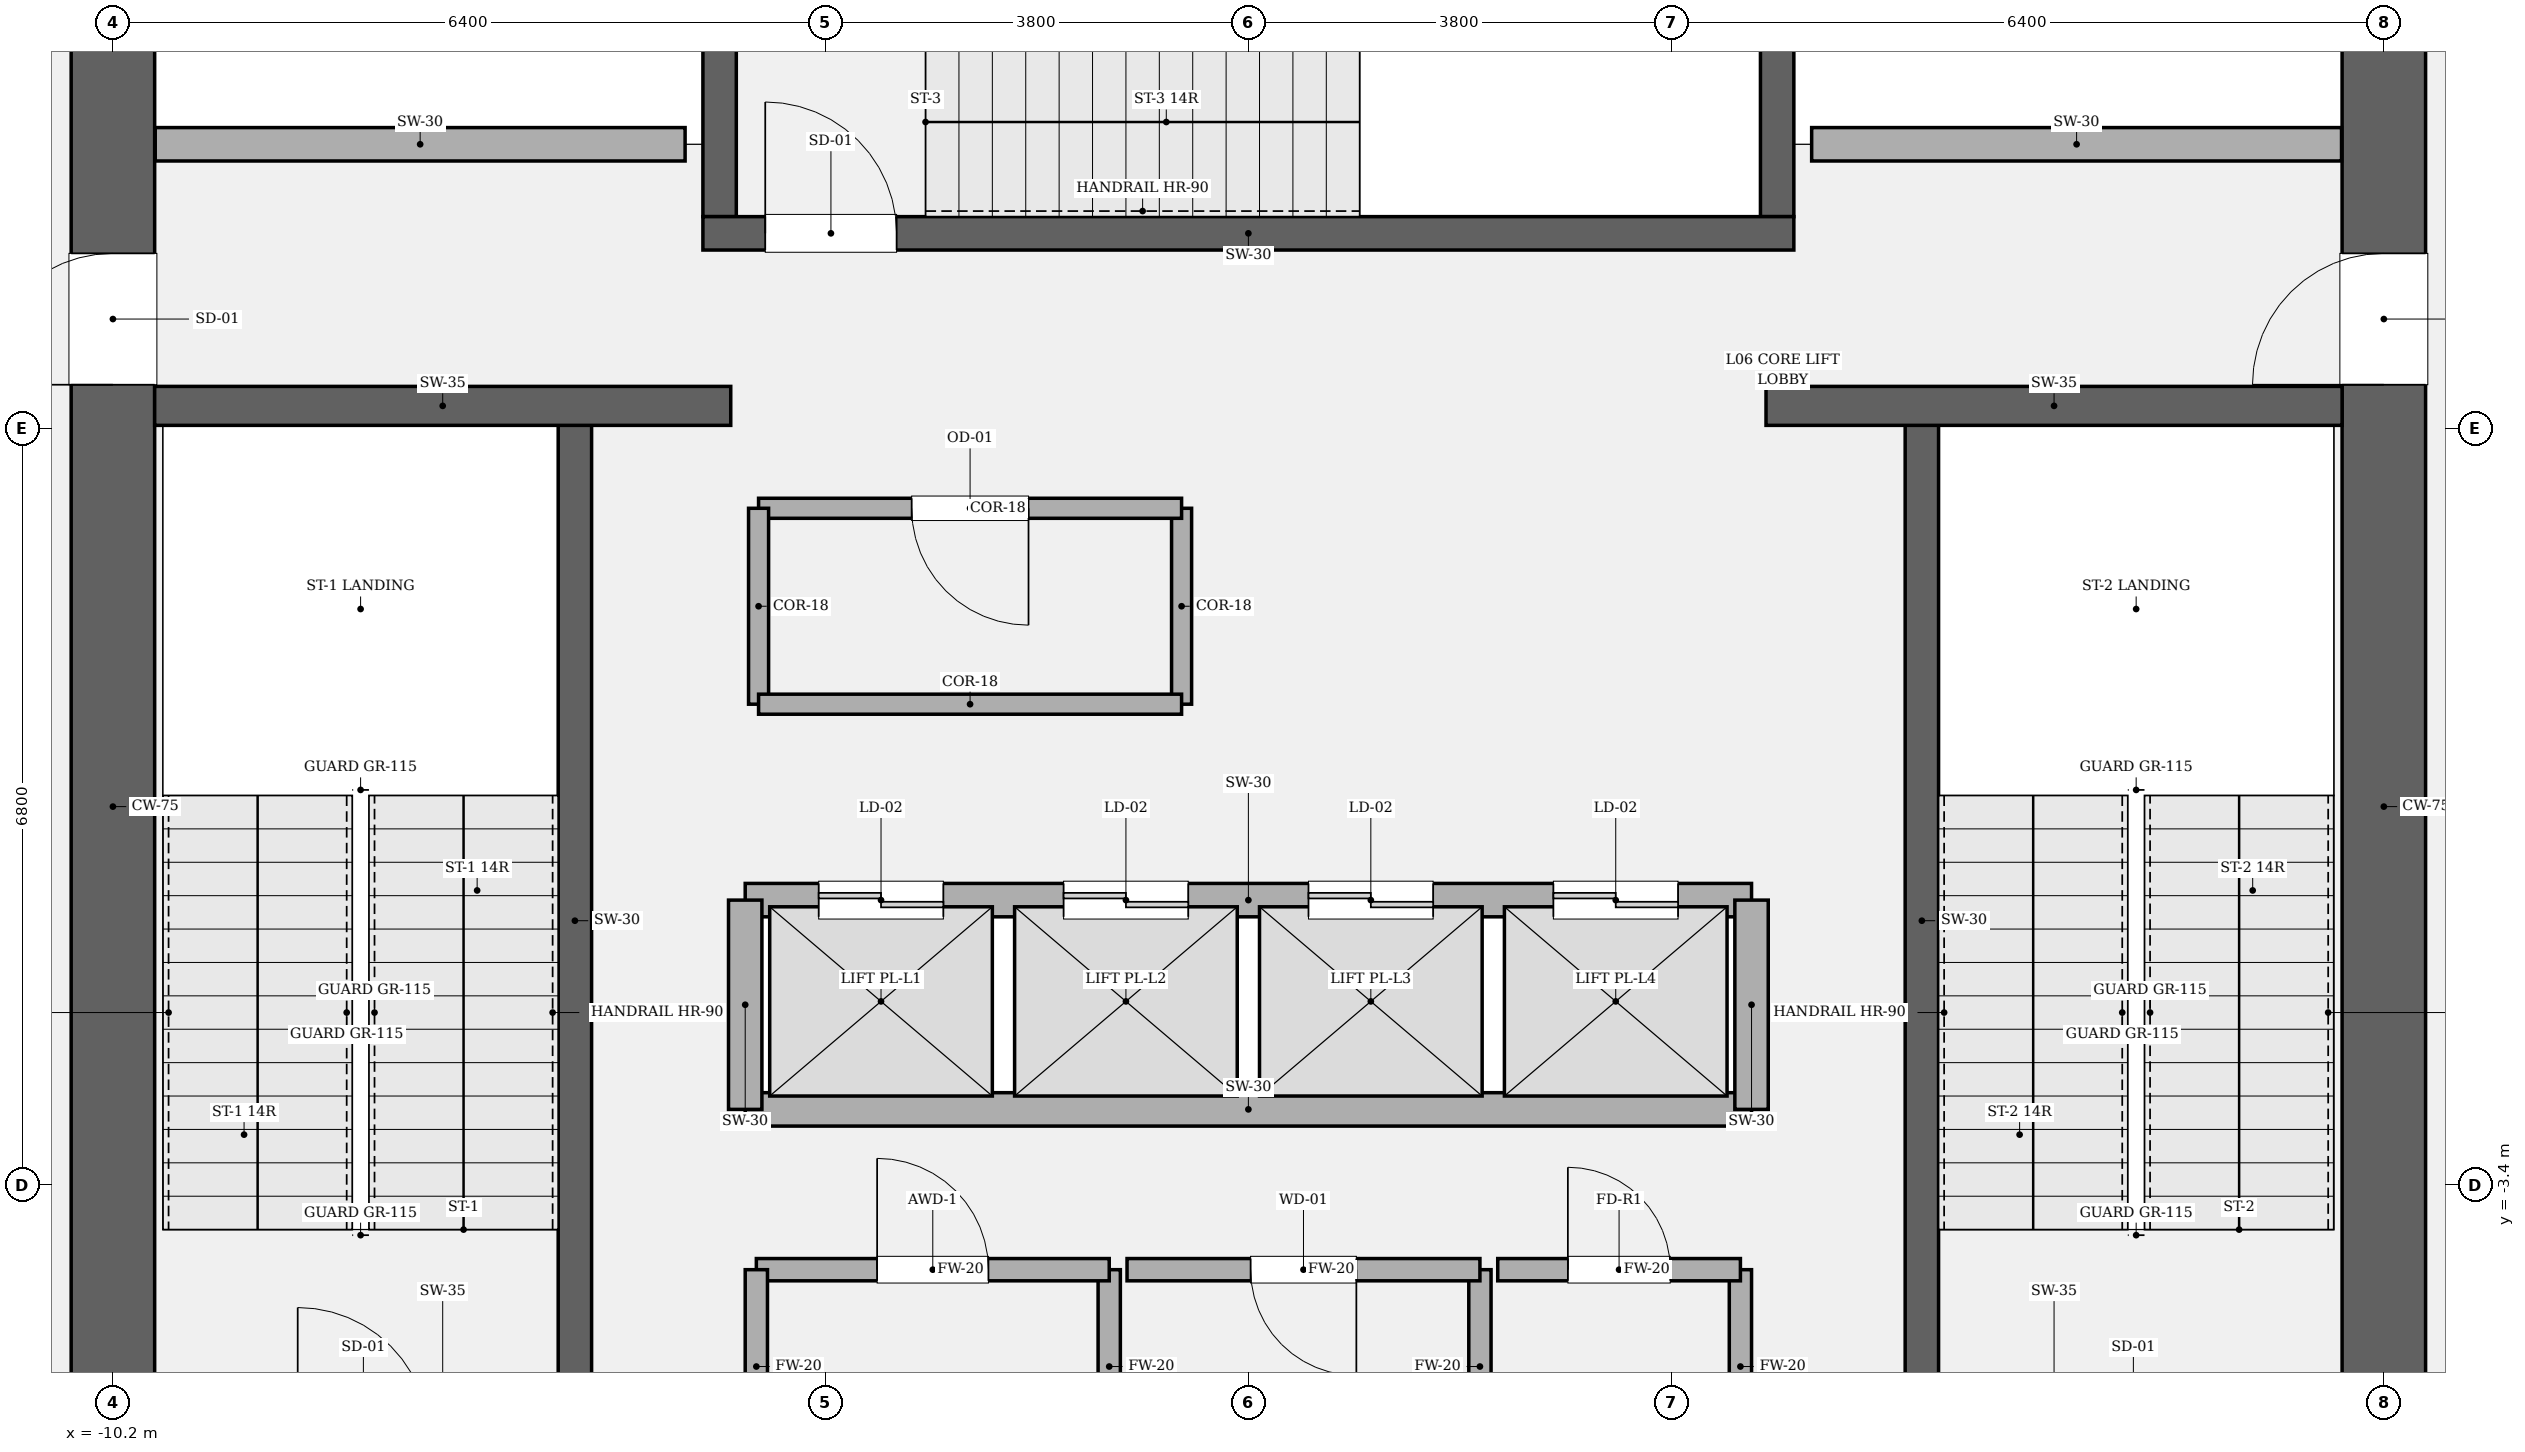
"""IFC4 building model, lengths in metres.
Left out: names, types, materials, properties, quantities, classifications, styles, units other than length and angle.
Written with IfcOpenShell. Run it as: python <this file> out.ifc"""

import sys

from ifc_helpers import new_model, si_unit, direction, frame, frame_2d, origin, place, context, subcontext, project, spatial, rectangle, extrude, element, fill, save


model = new_model("IFC4")
c1 = context("Model", 3, precision=1e-05, world=origin(), true_north=direction((0.0, 1.0)))
c2 = subcontext(c1, "Body", "Model", "MODEL_VIEW")
j1 = project(units=[si_unit("LENGTHUNIT", "METRE"), si_unit("PLANEANGLEUNIT", "RADIAN")], contexts=[c1])
p1 = place(None, origin())
s1 = spatial("IfcSite", under=j1, at=p1, CompositionType="ELEMENT")
p2 = place(p1, origin())
s2 = spatial("IfcBuilding", under=s1, at=p2, CompositionType="ELEMENT")
p3 = place(p2, frame((0.0, 0.0, 32.25)))
s3 = spatial("IfcBuildingStorey", under=s2, at=p3, CompositionType="ELEMENT", Elevation=32.25)
p4 = place(p3, frame((-10.2, -8.825, 0.0), z_axis=(0.0, 0.0, 1.0), x_axis=(0.0, 1.0, 0.0)))
e1 = element("IfcWall", 1, at=p4, inside=s3, PredefinedType="SHEAR", context=c2, shape_type="SweptSolid", body=[
    extrude(rectangle(XDim=17.65, YDim=0.75, at=frame_2d((8.825, 0.0))), origin(), (0.0, 0.0, 1.0), 4.05),
])
p5 = place(p4, frame((12.615, 0.0, 0.0)))
e2 = element("IfcOpeningElement", 2, at=p5, cuts=e1, PredefinedType="OPENING", context=c2, shape_type="SweptSolid", body=[
    extrude(rectangle(XDim=1.18, YDim=2.2, at=frame_2d((0.59, 1.1))), frame((0.0, 0.385, 0.0), z_axis=(0.0, -1.0, 0.0), x_axis=(1.0, 0.0, 0.0)), (0.0, 0.0, 1.0), 0.77),
])
p6 = place(p3, frame((10.2, 8.825, 0.0), z_axis=(0.0, 0.0, 1.0), x_axis=(0.0, -1.0, 0.0)))
e3 = element("IfcWall", 3, at=p6, inside=s3, PredefinedType="SHEAR", context=c2, shape_type="SweptSolid", body=[
    extrude(rectangle(XDim=17.65, YDim=0.75, at=frame_2d((8.825, 0.0))), origin(), (0.0, 0.0, 1.0), 4.05),
])
p7 = place(p6, frame((3.855, 0.0, 0.0)))
e4 = element("IfcOpeningElement", 4, at=p7, cuts=e3, PredefinedType="OPENING", context=c2, shape_type="SweptSolid", body=[
    extrude(rectangle(XDim=1.18, YDim=2.2, at=frame_2d((0.59, 1.1))), frame((0.0, 0.385, 0.0), z_axis=(0.0, -1.0, 0.0), x_axis=(1.0, 0.0, 0.0)), (0.0, 0.0, 1.0), 0.77),
])
for number, where, z_axis, x_axis in (
    (5, (-6.05, -5.5, 0.0), (0.0, 0.0, 1.0), (0.0, 1.0, 0.0)),
    (6, (6.05, 3.45, 0.0), (0.0, 0.0, 1.0), (0.0, -1.0, 0.0)),
):
    element("IfcWall", number, at=place(p3, frame(where, z_axis=z_axis, x_axis=x_axis)), inside=s3, PredefinedType="SOLIDWALL", context=c2, shape_type="SweptSolid", body=[
        extrude(rectangle(XDim=8.95, YDim=0.3, at=frame_2d((4.475, 0.0))), origin(), (0.0, 0.0, 1.0), 4.05),
    ])
for number, where, z_axis, x_axis in (
    (7, (-4.75, 5.3, 0.0), (0.0, 0.0, 1.0), (0.0, 1.0, 0.0)),
    (8, (4.75, 8.825, 0.0), (0.0, 0.0, 1.0), (0.0, -1.0, 0.0)),
):
    element("IfcWall", number, at=place(p3, frame(where, z_axis=z_axis, x_axis=x_axis)), inside=s3, PredefinedType="SOLIDWALL", context=c2, shape_type="SweptSolid", body=[
        extrude(rectangle(XDim=3.525, YDim=0.3, at=frame_2d((1.762, 0.0))), origin(), (0.0, 0.0, 1.0), 4.05),
    ])
p8 = place(p3, frame((-4.9, 5.15, 0.0), z_axis=(0.0, 0.0, 1.0), x_axis=(1.0, 0.0, 0.0)))
e9 = element("IfcWall", 9, at=p8, inside=s3, PredefinedType="SOLIDWALL", context=c2, shape_type="SweptSolid", body=[
    extrude(rectangle(XDim=9.8, YDim=0.3, at=frame_2d((4.9, 0.0))), origin(), (0.0, 0.0, 1.0), 4.05),
])
p9 = place(p8, frame((0.56, 0.0, 0.0)))
e10 = element("IfcOpeningElement", 10, at=p9, cuts=e9, PredefinedType="OPENING", context=c2, shape_type="SweptSolid", body=[
    extrude(rectangle(XDim=1.18, YDim=2.2, at=frame_2d((0.59, 1.1))), frame((0.0, 0.16, 0.0), z_axis=(0.0, -1.0, 0.0), x_axis=(1.0, 0.0, 0.0)), (0.0, 0.0, 1.0), 0.32),
])
for number, where, z_axis, x_axis in (
    (11, (-9.825, 3.6, 0.0), (0.0, 0.0, 1.0), (1.0, 0.0, 0.0)),
    (12, (4.65, 3.6, 0.0), (0.0, 0.0, 1.0), (1.0, 0.0, 0.0)),
):
    element("IfcWall", number, at=place(p3, frame(where, z_axis=z_axis, x_axis=x_axis)), inside=s3, PredefinedType="SOLIDWALL", context=c2, shape_type="SweptSolid", body=[
        extrude(rectangle(XDim=5.175, YDim=0.35, at=frame_2d((2.587, 0.0))), origin(), (0.0, 0.0, 1.0), 4.05),
    ])
p10 = place(p3, frame((-4.52, -0.84, 0.0), z_axis=(0.0, 0.0, 1.0), x_axis=(1.0, 0.0, 0.0)))
e13 = element("IfcWall", 13, at=p10, inside=s3, PredefinedType="SOLIDWALL", context=c2, shape_type="SweptSolid", body=[
    extrude(rectangle(XDim=9.04, YDim=0.3, at=frame_2d((4.52, 0.0))), origin(), (0.0, 0.0, 1.0), 3.81),
])
p11 = place(p10, frame((0.66, 0.0, 0.0)))
e14 = element("IfcOpeningElement", 14, at=p11, cuts=e13, PredefinedType="OPENING", context=c2, shape_type="SweptSolid", body=[
    extrude(rectangle(XDim=1.12, YDim=2.25, at=frame_2d((0.56, 1.125))), frame((0.0, 0.16, 0.0), z_axis=(0.0, -1.0, 0.0), x_axis=(1.0, 0.0, 0.0)), (0.0, 0.0, 1.0), 0.32),
])
p12 = place(p10, frame((2.86, 0.0, 0.0)))
e15 = element("IfcOpeningElement", 15, at=p12, cuts=e13, PredefinedType="OPENING", context=c2, shape_type="SweptSolid", body=[
    extrude(rectangle(XDim=1.12, YDim=2.25, at=frame_2d((0.56, 1.125))), frame((0.0, 0.16, 0.0), z_axis=(0.0, -1.0, 0.0), x_axis=(1.0, 0.0, 0.0)), (0.0, 0.0, 1.0), 0.32),
])
p13 = place(p10, frame((5.06, 0.0, 0.0)))
e16 = element("IfcOpeningElement", 16, at=p13, cuts=e13, PredefinedType="OPENING", context=c2, shape_type="SweptSolid", body=[
    extrude(rectangle(XDim=1.12, YDim=2.25, at=frame_2d((0.56, 1.125))), frame((0.0, 0.16, 0.0), z_axis=(0.0, -1.0, 0.0), x_axis=(1.0, 0.0, 0.0)), (0.0, 0.0, 1.0), 0.32),
])
p14 = place(p10, frame((7.26, 0.0, 0.0)))
e17 = element("IfcOpeningElement", 17, at=p14, cuts=e13, PredefinedType="OPENING", context=c2, shape_type="SweptSolid", body=[
    extrude(rectangle(XDim=1.12, YDim=2.25, at=frame_2d((0.56, 1.125))), frame((0.0, 0.16, 0.0), z_axis=(0.0, -1.0, 0.0), x_axis=(1.0, 0.0, 0.0)), (0.0, 0.0, 1.0), 0.32),
])
p15 = place(p3, frame((-4.52, -2.72, 0.0), z_axis=(0.0, 0.0, 1.0), x_axis=(1.0, 0.0, 0.0)))
e18 = element("IfcWall", 18, at=p15, inside=s3, PredefinedType="SOLIDWALL", context=c2, shape_type="SweptSolid", body=[
    extrude(rectangle(XDim=9.04, YDim=0.3, at=frame_2d((4.52, 0.0))), origin(), (0.0, 0.0, 1.0), 3.81),
])
for number, where, z_axis, x_axis in (
    (19, (-4.52, -2.72, 0.0), (0.0, 0.0, 1.0), (0.0, 1.0, 0.0)),
    (20, (4.52, -2.72, 0.0), (0.0, 0.0, 1.0), (0.0, 1.0, 0.0)),
):
    element("IfcWall", number, at=place(p3, frame(where, z_axis=z_axis, x_axis=x_axis)), inside=s3, PredefinedType="SOLIDWALL", context=c2, shape_type="SweptSolid", body=[
        extrude(rectangle(XDim=1.88, YDim=0.3, at=frame_2d((0.94, 0.0))), origin(), (0.0, 0.0, 1.0), 3.81),
    ])
for number, where, z_axis, x_axis in (
    (21, (-9.82, 5.95, 0.0), (0.0, 0.0, 1.0), (1.0, 0.0, 0.0)),
    (22, (5.06, 5.95, 0.0), (0.0, 0.0, 1.0), (1.0, 0.0, 0.0)),
):
    element("IfcWall", number, at=place(p3, frame(where, z_axis=z_axis, x_axis=x_axis)), inside=s3, PredefinedType="SOLIDWALL", context=c2, shape_type="SweptSolid", body=[
        extrude(rectangle(XDim=4.76, YDim=0.3, at=frame_2d((2.38, 0.0))), origin(), (0.0, 0.0, 1.0), 3.81),
    ])
p16 = place(p3, frame((-1.25, -5.9, 0.0), z_axis=(0.0, 0.0, 1.0), x_axis=(0.0, 1.0, 0.0)))
e23 = element("IfcWall", 23, at=p16, inside=s3, PredefinedType="SOLIDWALL", context=c2, shape_type="SweptSolid", body=[
    extrude(rectangle(XDim=1.74, YDim=0.2, at=frame_2d((0.87, 0.0))), origin(), (0.0, 0.0, 1.0), 3.81),
])
p17 = place(p3, frame((-1.25, -4.16, 0.0), z_axis=(0.0, 0.0, 1.0), x_axis=(-1.0, 0.0, 0.0)))
e24 = element("IfcWall", 24, at=p17, inside=s3, PredefinedType="SOLIDWALL", context=c2, shape_type="SweptSolid", body=[
    extrude(rectangle(XDim=3.17, YDim=0.2, at=frame_2d((1.585, 0.0))), origin(), (0.0, 0.0, 1.0), 3.81),
])
p18 = place(p17, frame((1.085, 0.0, 0.0)))
e25 = element("IfcOpeningElement", 25, at=p18, cuts=e24, PredefinedType="OPENING", context=c2, shape_type="SweptSolid", body=[
    extrude(rectangle(XDim=1.0, YDim=2.15, at=frame_2d((0.5, 1.075))), frame((0.0, 0.11, 0.0), z_axis=(0.0, -1.0, 0.0), x_axis=(1.0, 0.0, 0.0)), (0.0, 0.0, 1.0), 0.22),
])
for number, where, z_axis, x_axis in (
    (26, (-4.42, -4.16, 0.0), (0.0, 0.0, 1.0), (0.0, -1.0, 0.0)),
    (27, (2.08, -5.9, 0.0), (0.0, 0.0, 1.0), (0.0, 1.0, 0.0)),
):
    element("IfcWall", number, at=place(p3, frame(where, z_axis=z_axis, x_axis=x_axis)), inside=s3, PredefinedType="SOLIDWALL", context=c2, shape_type="SweptSolid", body=[
        extrude(rectangle(XDim=1.74, YDim=0.2, at=frame_2d((0.87, 0.0))), origin(), (0.0, 0.0, 1.0), 3.81),
    ])
p19 = place(p3, frame((2.08, -4.16, 0.0), z_axis=(0.0, 0.0, 1.0), x_axis=(-1.0, 0.0, 0.0)))
e28 = element("IfcWall", 28, at=p19, inside=s3, PredefinedType="SOLIDWALL", context=c2, shape_type="SweptSolid", body=[
    extrude(rectangle(XDim=3.17, YDim=0.2, at=frame_2d((1.585, 0.0))), origin(), (0.0, 0.0, 1.0), 3.81),
])
p20 = place(p19, frame((1.11, 0.0, 0.0)))
e29 = element("IfcOpeningElement", 29, at=p20, cuts=e28, PredefinedType="OPENING", context=c2, shape_type="SweptSolid", body=[
    extrude(rectangle(XDim=0.95, YDim=2.15, at=frame_2d((0.475, 1.075))), frame((0.0, 0.11, 0.0), z_axis=(0.0, -1.0, 0.0), x_axis=(1.0, 0.0, 0.0)), (0.0, 0.0, 1.0), 0.22),
])
p21 = place(p3, frame((4.42, -5.9, 0.0), z_axis=(0.0, 0.0, 1.0), x_axis=(0.0, 1.0, 0.0)))
e30 = element("IfcWall", 30, at=p21, inside=s3, PredefinedType="SOLIDWALL", context=c2, shape_type="SweptSolid", body=[
    extrude(rectangle(XDim=1.74, YDim=0.2, at=frame_2d((0.87, 0.0))), origin(), (0.0, 0.0, 1.0), 3.81),
])
p22 = place(p3, frame((4.42, -4.16, 0.0), z_axis=(0.0, 0.0, 1.0), x_axis=(-1.0, 0.0, 0.0)))
e31 = element("IfcWall", 31, at=p22, inside=s3, PredefinedType="SOLIDWALL", context=c2, shape_type="SweptSolid", body=[
    extrude(rectangle(XDim=2.18, YDim=0.2, at=frame_2d((1.09, 0.0))), origin(), (0.0, 0.0, 1.0), 3.81),
])
p23 = place(p22, frame((0.63, 0.0, 0.0)))
e32 = element("IfcOpeningElement", 32, at=p23, cuts=e31, PredefinedType="OPENING", context=c2, shape_type="SweptSolid", body=[
    extrude(rectangle(XDim=0.92, YDim=2.1, at=frame_2d((0.46, 1.05))), frame((0.0, 0.11, 0.0), z_axis=(0.0, -1.0, 0.0), x_axis=(1.0, 0.0, 0.0)), (0.0, 0.0, 1.0), 0.22),
])
p24 = place(p3, frame((-0.6, 0.92, 0.0), z_axis=(0.0, 0.0, 1.0), x_axis=(0.0, 1.0, 0.0)))
e33 = element("IfcWall", 33, at=p24, inside=s3, PredefinedType="PARTITIONING", context=c2, shape_type="SweptSolid", body=[
    extrude(rectangle(XDim=1.76, YDim=0.18, at=frame_2d((0.88, 0.0))), origin(), (0.0, 0.0, 1.0), 3.81),
])
p25 = place(p3, frame((-0.6, 2.68, 0.0), z_axis=(0.0, 0.0, 1.0), x_axis=(-1.0, 0.0, 0.0)))
e34 = element("IfcWall", 34, at=p25, inside=s3, PredefinedType="PARTITIONING", context=c2, shape_type="SweptSolid", body=[
    extrude(rectangle(XDim=3.8, YDim=0.18, at=frame_2d((1.9, 0.0))), origin(), (0.0, 0.0, 1.0), 3.81),
])
p26 = place(p25, frame((1.375, 0.0, 0.0)))
e35 = element("IfcOpeningElement", 35, at=p26, cuts=e34, PredefinedType="OPENING", context=c2, shape_type="SweptSolid", body=[
    extrude(rectangle(XDim=1.05, YDim=2.2, at=frame_2d((0.525, 1.1))), frame((0.0, 0.1, 0.0), z_axis=(0.0, -1.0, 0.0), x_axis=(1.0, 0.0, 0.0)), (0.0, 0.0, 1.0), 0.2),
])
p27 = place(p3, frame((-4.4, 2.68, 0.0), z_axis=(0.0, 0.0, 1.0), x_axis=(0.0, -1.0, 0.0)))
e36 = element("IfcWall", 36, at=p27, inside=s3, PredefinedType="PARTITIONING", context=c2, shape_type="SweptSolid", body=[
    extrude(rectangle(XDim=1.76, YDim=0.18, at=frame_2d((0.88, 0.0))), origin(), (0.0, 0.0, 1.0), 3.81),
])
p28 = place(p3, frame((-4.4, 0.92, 0.0), z_axis=(0.0, 0.0, 1.0), x_axis=(1.0, 0.0, 0.0)))
e37 = element("IfcWall", 37, at=p28, inside=s3, PredefinedType="PARTITIONING", context=c2, shape_type="SweptSolid", body=[
    extrude(rectangle(XDim=3.8, YDim=0.18, at=frame_2d((1.9, 0.0))), origin(), (0.0, 0.0, 1.0), 3.81),
])
p29 = place(p9, origin())
e38 = element("IfcDoor", 38, at=p29, inside=s3, OperationType="SINGLE_SWING_LEFT", PredefinedType="DOOR", context=c2, shape_type="SweptSolid", body=[
    extrude(rectangle(XDim=1.18, YDim=2.2, at=frame_2d((0.59, 1.1))), frame((0.0, 0.025, 0.0), z_axis=(0.0, -1.0, 0.0), x_axis=(1.0, 0.0, 0.0)), (0.0, 0.0, 1.0), 0.05),
])
fill(e10, e38)
p30 = place(p5, origin())
e39 = element("IfcDoor", 39, at=p30, inside=s3, OperationType="SINGLE_SWING_LEFT", PredefinedType="DOOR", context=c2, shape_type="SweptSolid", body=[
    extrude(rectangle(XDim=1.18, YDim=2.2, at=frame_2d((0.59, 1.1))), frame((0.0, 0.025, 0.0), z_axis=(0.0, -1.0, 0.0), x_axis=(1.0, 0.0, 0.0)), (0.0, 0.0, 1.0), 0.05),
])
fill(e2, e39)
p31 = place(p7, origin())
e40 = element("IfcDoor", 40, at=p31, inside=s3, OperationType="SINGLE_SWING_RIGHT", PredefinedType="DOOR", context=c2, shape_type="SweptSolid", body=[
    extrude(rectangle(XDim=1.18, YDim=2.2, at=frame_2d((0.59, 1.1))), frame((0.0, 0.025, 0.0), z_axis=(0.0, -1.0, 0.0), x_axis=(1.0, 0.0, 0.0)), (0.0, 0.0, 1.0), 0.05),
])
fill(e4, e40)
p32 = place(p11, origin())
e41 = element("IfcDoor", 41, at=p32, inside=s3, OperationType="DOUBLE_DOOR_SLIDING", PredefinedType="DOOR", context=c2, shape_type="SweptSolid", body=[
    extrude(rectangle(XDim=1.12, YDim=2.25, at=frame_2d((0.56, 1.125))), frame((0.0, 0.025, 0.0), z_axis=(0.0, -1.0, 0.0), x_axis=(1.0, 0.0, 0.0)), (0.0, 0.0, 1.0), 0.05),
])
fill(e14, e41)
p33 = place(p12, origin())
e42 = element("IfcDoor", 42, at=p33, inside=s3, OperationType="DOUBLE_DOOR_SLIDING", PredefinedType="DOOR", context=c2, shape_type="SweptSolid", body=[
    extrude(rectangle(XDim=1.12, YDim=2.25, at=frame_2d((0.56, 1.125))), frame((0.0, 0.025, 0.0), z_axis=(0.0, -1.0, 0.0), x_axis=(1.0, 0.0, 0.0)), (0.0, 0.0, 1.0), 0.05),
])
fill(e15, e42)
p34 = place(p13, origin())
e43 = element("IfcDoor", 43, at=p34, inside=s3, OperationType="DOUBLE_DOOR_SLIDING", PredefinedType="DOOR", context=c2, shape_type="SweptSolid", body=[
    extrude(rectangle(XDim=1.12, YDim=2.25, at=frame_2d((0.56, 1.125))), frame((0.0, 0.025, 0.0), z_axis=(0.0, -1.0, 0.0), x_axis=(1.0, 0.0, 0.0)), (0.0, 0.0, 1.0), 0.05),
])
fill(e16, e43)
p35 = place(p14, origin())
e44 = element("IfcDoor", 44, at=p35, inside=s3, OperationType="DOUBLE_DOOR_SLIDING", PredefinedType="DOOR", context=c2, shape_type="SweptSolid", body=[
    extrude(rectangle(XDim=1.12, YDim=2.25, at=frame_2d((0.56, 1.125))), frame((0.0, 0.025, 0.0), z_axis=(0.0, -1.0, 0.0), x_axis=(1.0, 0.0, 0.0)), (0.0, 0.0, 1.0), 0.05),
])
fill(e17, e44)
p36 = place(p18, origin())
e45 = element("IfcDoor", 45, at=p36, inside=s3, OperationType="SINGLE_SWING_RIGHT", PredefinedType="DOOR", context=c2, shape_type="SweptSolid", body=[
    extrude(rectangle(XDim=1.0, YDim=2.15, at=frame_2d((0.5, 1.075))), frame((0.0, 0.025, 0.0), z_axis=(0.0, -1.0, 0.0), x_axis=(1.0, 0.0, 0.0)), (0.0, 0.0, 1.0), 0.05),
])
fill(e25, e45)
p37 = place(p20, origin())
e46 = element("IfcDoor", 46, at=p37, inside=s3, OperationType="SINGLE_SWING_LEFT", PredefinedType="DOOR", context=c2, shape_type="SweptSolid", body=[
    extrude(rectangle(XDim=0.95, YDim=2.15, at=frame_2d((0.475, 1.075))), frame((0.0, 0.025, 0.0), z_axis=(0.0, -1.0, 0.0), x_axis=(1.0, 0.0, 0.0)), (0.0, 0.0, 1.0), 0.05),
])
fill(e29, e46)
p38 = place(p23, origin())
e47 = element("IfcDoor", 47, at=p38, inside=s3, OperationType="SINGLE_SWING_RIGHT", PredefinedType="DOOR", context=c2, shape_type="SweptSolid", body=[
    extrude(rectangle(XDim=0.92, YDim=2.1, at=frame_2d((0.46, 1.05))), frame((0.0, 0.025, 0.0), z_axis=(0.0, -1.0, 0.0), x_axis=(1.0, 0.0, 0.0)), (0.0, 0.0, 1.0), 0.05),
])
fill(e32, e47)
p39 = place(p26, origin())
e48 = element("IfcDoor", 48, at=p39, inside=s3, OperationType="SINGLE_SWING_LEFT", PredefinedType="DOOR", context=c2, shape_type="SweptSolid", body=[
    extrude(rectangle(XDim=1.05, YDim=2.2, at=frame_2d((0.525, 1.1))), frame((0.0, 0.025, 0.0), z_axis=(0.0, -1.0, 0.0), x_axis=(1.0, 0.0, 0.0)), (0.0, 0.0, 1.0), 0.05),
])
fill(e35, e48)
save(model, sys.argv[1])
